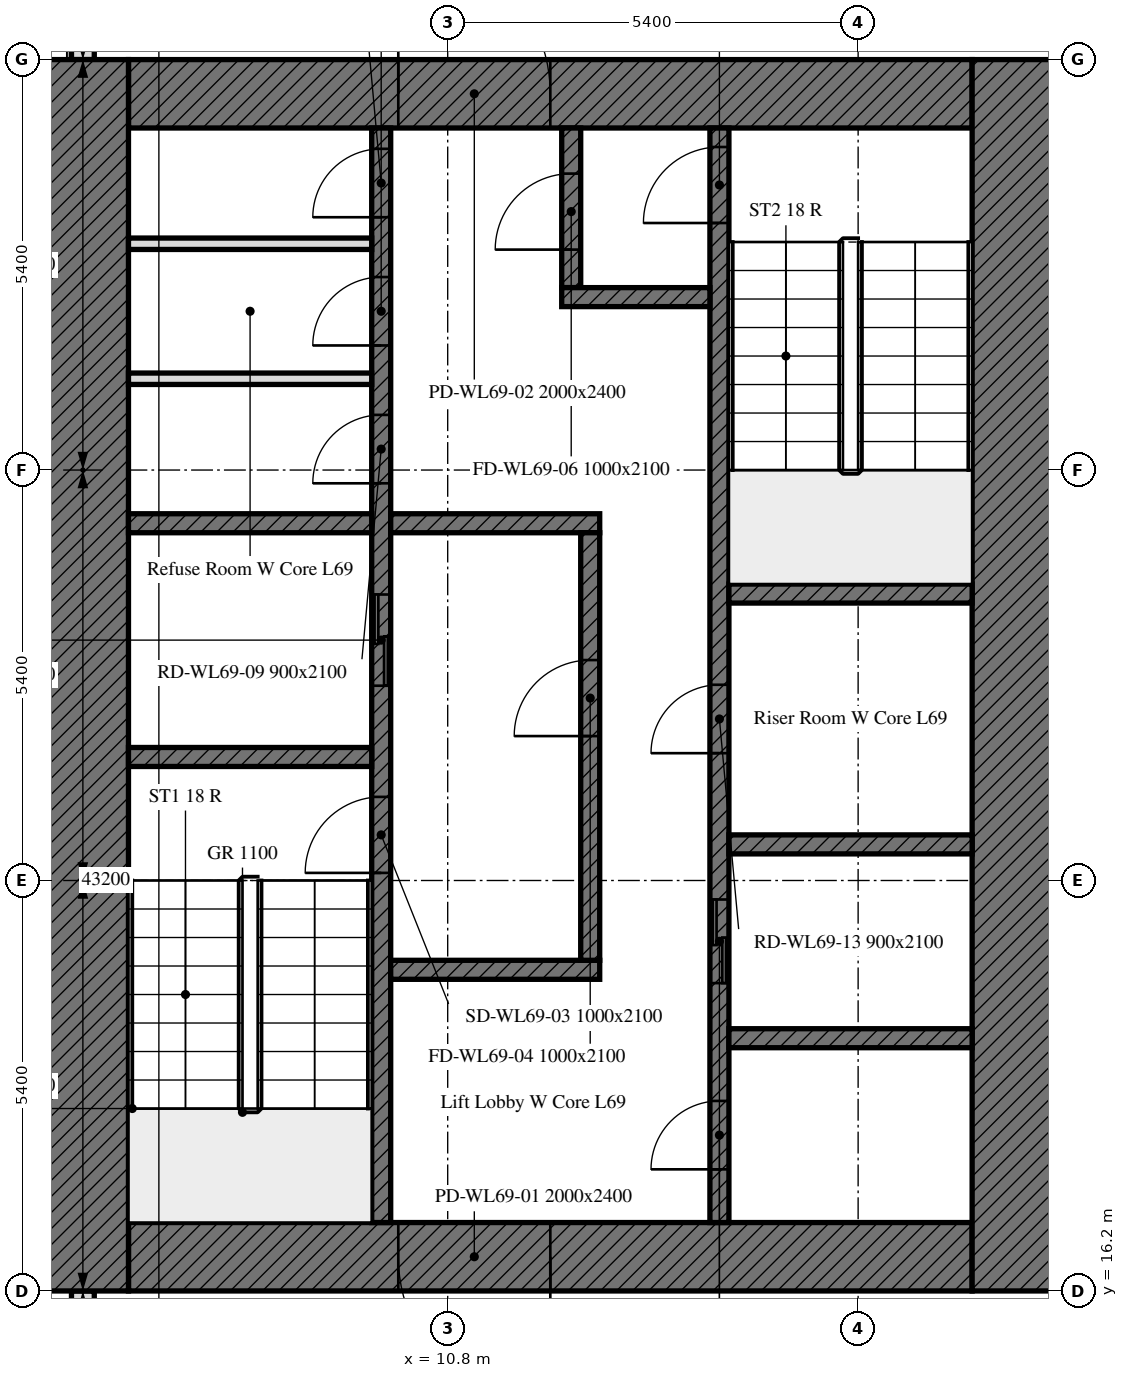
"""IFC4 building model, lengths in metres.
Left out: names, types, materials, properties, quantities, classifications, styles, units other than length and angle.
Written with IfcOpenShell. Run it as: python <this file> out.ifc"""

import sys

from ifc_helpers import new_model, si_unit, direction, frame, frame_2d, origin, place, context, subcontext, project, spatial, rectangle, extrude, element, fill, save


model = new_model("IFC4")
c1 = context("Model", 3, precision=1e-05, world=origin(), true_north=direction((0.0, 1.0)))
c2 = subcontext(c1, "Body", "Model", "MODEL_VIEW")
j1 = project(units=[si_unit("LENGTHUNIT", "METRE"), si_unit("PLANEANGLEUNIT", "RADIAN")], contexts=[c1])
p1 = place(None, origin())
s1 = spatial("IfcSite", under=j1, at=p1, CompositionType="ELEMENT")
p2 = place(p1, origin())
s2 = spatial("IfcBuilding", under=s1, at=p2, CompositionType="ELEMENT")
p3 = place(p2, frame((0.0, 0.0, 281.8)))
s3 = spatial("IfcBuildingStorey", under=s2, at=p3, CompositionType="ELEMENT", Elevation=281.8)
p4 = place(p3, frame((6.0, 37.614, 0.0), z_axis=(0.0, 0.0, 1.0), x_axis=(0.0, -1.0, 0.0)))
e1 = element("IfcWall", 1, at=p4, inside=s3, PredefinedType="SOLIDWALL", context=c2, shape_type="SweptSolid", body=[
    extrude(rectangle(XDim=5.214, YDim=0.3, at=frame_2d((2.607, 0.0))), origin(), (0.0, 0.0, 1.0), 3.0),
])
p5 = place(p4, frame((1.164, 0.0, 0.9)))
e2 = element("IfcOpeningElement", 2, at=p5, cuts=e1, PredefinedType="OPENING", context=c2, shape_type="SweptSolid", body=[
    extrude(rectangle(XDim=1.1, YDim=1.7, at=frame_2d((0.55, 0.85))), frame((0.0, 0.16, 0.0), z_axis=(0.0, -1.0, 0.0), x_axis=(1.0, 0.0, 0.0)), (0.0, 0.0, 1.0), 0.32),
])
p6 = place(p4, frame((3.139, 0.0, 0.9)))
e3 = element("IfcOpeningElement", 3, at=p6, cuts=e1, PredefinedType="OPENING", context=c2, shape_type="SweptSolid", body=[
    extrude(rectangle(XDim=0.65, YDim=1.7, at=frame_2d((0.325, 0.85))), frame((0.0, 0.16, 0.0), z_axis=(0.0, -1.0, 0.0), x_axis=(1.0, 0.0, 0.0)), (0.0, 0.0, 1.0), 0.32),
])
p7 = place(p3, frame((6.0, 16.2, 0.0), z_axis=(0.0, 0.0, 1.0), x_axis=(0.0, -1.0, 0.0)))
e4 = element("IfcWall", 4, at=p7, inside=s3, PredefinedType="SOLIDWALL", context=c2, shape_type="SweptSolid", body=[
    extrude(rectangle(XDim=10.614, YDim=0.3, at=frame_2d((5.307, 0.0))), origin(), (0.0, 0.0, 1.0), 3.0),
])
p8 = place(p7, frame((1.0, 0.0, 0.9)))
e5 = element("IfcOpeningElement", 5, at=p8, cuts=e4, PredefinedType="OPENING", context=c2, shape_type="SweptSolid", body=[
    extrude(rectangle(XDim=1.1, YDim=1.7, at=frame_2d((0.55, 0.85))), frame((0.0, 0.16, 0.0), z_axis=(0.0, -1.0, 0.0), x_axis=(1.0, 0.0, 0.0)), (0.0, 0.0, 1.0), 0.32),
])
p9 = place(p7, frame((2.95, 0.0, 0.9)))
e6 = element("IfcOpeningElement", 6, at=p9, cuts=e4, PredefinedType="OPENING", context=c2, shape_type="SweptSolid", body=[
    extrude(rectangle(XDim=1.1, YDim=1.7, at=frame_2d((0.55, 0.85))), frame((0.0, 0.16, 0.0), z_axis=(0.0, -1.0, 0.0), x_axis=(1.0, 0.0, 0.0)), (0.0, 0.0, 1.0), 0.32),
])
p10 = place(p7, frame((6.4, 0.0, 0.9)))
e7 = element("IfcOpeningElement", 7, at=p10, cuts=e4, PredefinedType="OPENING", context=c2, shape_type="SweptSolid", body=[
    extrude(rectangle(XDim=3.4, YDim=1.7, at=frame_2d((1.7, 0.85))), frame((0.0, 0.16, 0.0), z_axis=(0.0, -1.0, 0.0), x_axis=(1.0, 0.0, 0.0)), (0.0, 0.0, 1.0), 0.32),
])
p11 = place(p3, frame((17.7, 16.65, 0.0), z_axis=(0.0, 0.0, 1.0), x_axis=(-1.0, 0.0, 0.0)))
e8 = element("IfcWall", 8, at=p11, inside=s3, PredefinedType="SOLIDWALL", context=c2, shape_type="SweptSolid", body=[
    extrude(rectangle(XDim=11.1, YDim=0.9, at=frame_2d((5.55, 0.0))), origin(), (0.0, 0.0, 1.0), 3.0),
])
p12 = place(p11, frame((5.55, 0.0, 0.0)))
e9 = element("IfcOpeningElement", 9, at=p12, cuts=e8, PredefinedType="OPENING", context=c2, shape_type="SweptSolid", body=[
    extrude(rectangle(XDim=2.0, YDim=2.4, at=frame_2d((1.0, 1.2))), frame((0.0, 0.45, 0.0), z_axis=(0.0, -1.0, 0.0), x_axis=(1.0, 0.0, 0.0)), (0.0, 0.0, 1.0), 0.9),
])
p13 = place(p3, frame((6.6, 31.95, 0.0), z_axis=(0.0, 0.0, 1.0), x_axis=(1.0, 0.0, 0.0)))
e10 = element("IfcWall", 10, at=p13, inside=s3, PredefinedType="SOLIDWALL", context=c2, shape_type="SweptSolid", body=[
    extrude(rectangle(XDim=11.1, YDim=0.9, at=frame_2d((5.55, 0.0))), origin(), (0.0, 0.0, 1.0), 3.0),
])
p14 = place(p13, frame((3.55, 0.0, 0.0)))
e11 = element("IfcOpeningElement", 11, at=p14, cuts=e10, PredefinedType="OPENING", context=c2, shape_type="SweptSolid", body=[
    extrude(rectangle(XDim=2.0, YDim=2.4, at=frame_2d((1.0, 1.2))), frame((0.0, 0.45, 0.0), z_axis=(0.0, -1.0, 0.0), x_axis=(1.0, 0.0, 0.0)), (0.0, 0.0, 1.0), 0.9),
])
for number, where, z_axis, x_axis in (
    (12, (6.0, 16.2, 0.0), (0.0, 0.0, 1.0), (0.0, 1.0, 0.0)),
    (13, (18.3, 32.4, 0.0), (0.0, 0.0, 1.0), (0.0, -1.0, 0.0)),
):
    element("IfcWall", number, at=place(p3, frame(where, z_axis=z_axis, x_axis=x_axis)), inside=s3, PredefinedType="SOLIDWALL", context=c2, shape_type="SweptSolid", body=[
        extrude(rectangle(XDim=16.2, YDim=1.2, at=frame_2d((8.1, 0.0))), origin(), (0.0, 0.0, 1.0), 3.0),
    ])
p15 = place(p3, frame((9.925, 17.1, 0.0), z_axis=(0.0, 0.0, 1.0), x_axis=(0.0, 1.0, 0.0)))
e14 = element("IfcWall", 14, at=p15, inside=s3, PredefinedType="SOLIDWALL", context=c2, shape_type="SweptSolid", body=[
    extrude(rectangle(XDim=14.4, YDim=0.25, at=frame_2d((7.2, 0.0))), origin(), (0.0, 0.0, 1.0), 3.0),
])
p16 = place(p15, frame((4.6, 0.0, 0.0)))
e15 = element("IfcOpeningElement", 15, at=p16, cuts=e14, PredefinedType="OPENING", context=c2, shape_type="SweptSolid", body=[
    extrude(rectangle(XDim=1.0, YDim=2.1, at=frame_2d((0.5, 1.05))), frame((0.0, 0.125, 0.0), z_axis=(0.0, -1.0, 0.0), x_axis=(1.0, 0.0, 0.0)), (0.0, 0.0, 1.0), 0.25),
])
p17 = place(p15, frame((7.062, 0.0, 0.0)))
e16 = element("IfcOpeningElement", 16, at=p17, cuts=e14, PredefinedType="OPENING", context=c2, shape_type="SweptSolid", body=[
    extrude(rectangle(XDim=1.2, YDim=2.1, at=frame_2d((0.6, 1.05))), frame((0.0, 0.125, 0.0), z_axis=(0.0, -1.0, 0.0), x_axis=(1.0, 0.0, 0.0)), (0.0, 0.0, 1.0), 0.25),
])
p18 = place(p15, frame((9.726, 0.0, 0.0)))
e17 = element("IfcOpeningElement", 17, at=p18, cuts=e14, PredefinedType="OPENING", context=c2, shape_type="SweptSolid", body=[
    extrude(rectangle(XDim=0.9, YDim=2.1, at=frame_2d((0.45, 1.05))), frame((0.0, 0.125, 0.0), z_axis=(0.0, -1.0, 0.0), x_axis=(1.0, 0.0, 0.0)), (0.0, 0.0, 1.0), 0.25),
])
p19 = place(p15, frame((11.539, 0.0, 0.0)))
e18 = element("IfcOpeningElement", 18, at=p19, cuts=e14, PredefinedType="OPENING", context=c2, shape_type="SweptSolid", body=[
    extrude(rectangle(XDim=0.9, YDim=2.1, at=frame_2d((0.45, 1.05))), frame((0.0, 0.125, 0.0), z_axis=(0.0, -1.0, 0.0), x_axis=(1.0, 0.0, 0.0)), (0.0, 0.0, 1.0), 0.25),
])
p20 = place(p15, frame((13.226, 0.0, 0.0)))
e19 = element("IfcOpeningElement", 19, at=p20, cuts=e14, PredefinedType="OPENING", context=c2, shape_type="SweptSolid", body=[
    extrude(rectangle(XDim=0.9, YDim=2.1, at=frame_2d((0.45, 1.05))), frame((0.0, 0.125, 0.0), z_axis=(0.0, -1.0, 0.0), x_axis=(1.0, 0.0, 0.0)), (0.0, 0.0, 1.0), 0.25),
])
p21 = place(p3, frame((14.375, 17.1, 0.0), z_axis=(0.0, 0.0, 1.0), x_axis=(0.0, 1.0, 0.0)))
e20 = element("IfcWall", 20, at=p21, inside=s3, PredefinedType="SOLIDWALL", context=c2, shape_type="SweptSolid", body=[
    extrude(rectangle(XDim=14.4, YDim=0.25, at=frame_2d((7.2, 0.0))), origin(), (0.0, 0.0, 1.0), 3.0),
])
p22 = place(p21, frame((13.15, 0.0, 0.0)))
e21 = element("IfcOpeningElement", 21, at=p22, cuts=e20, PredefinedType="OPENING", context=c2, shape_type="SweptSolid", body=[
    extrude(rectangle(XDim=1.0, YDim=2.1, at=frame_2d((0.5, 1.05))), frame((0.0, 0.125, 0.0), z_axis=(0.0, -1.0, 0.0), x_axis=(1.0, 0.0, 0.0)), (0.0, 0.0, 1.0), 0.25),
])
p23 = place(p21, frame((3.15, 0.0, 0.0)))
e22 = element("IfcOpeningElement", 22, at=p23, cuts=e20, PredefinedType="OPENING", context=c2, shape_type="SweptSolid", body=[
    extrude(rectangle(XDim=1.1, YDim=2.1, at=frame_2d((0.55, 1.05))), frame((0.0, 0.125, 0.0), z_axis=(0.0, -1.0, 0.0), x_axis=(1.0, 0.0, 0.0)), (0.0, 0.0, 1.0), 0.25),
])
p24 = place(p21, frame((0.7, 0.0, 0.0)))
e23 = element("IfcOpeningElement", 23, at=p24, cuts=e20, PredefinedType="OPENING", context=c2, shape_type="SweptSolid", body=[
    extrude(rectangle(XDim=0.9, YDim=2.1, at=frame_2d((0.45, 1.05))), frame((0.0, 0.125, 0.0), z_axis=(0.0, -1.0, 0.0), x_axis=(1.0, 0.0, 0.0)), (0.0, 0.0, 1.0), 0.25),
])
p25 = place(p21, frame((6.175, 0.0, 0.0)))
e24 = element("IfcOpeningElement", 24, at=p25, cuts=e20, PredefinedType="OPENING", context=c2, shape_type="SweptSolid", body=[
    extrude(rectangle(XDim=0.9, YDim=2.1, at=frame_2d((0.45, 1.05))), frame((0.0, 0.125, 0.0), z_axis=(0.0, -1.0, 0.0), x_axis=(1.0, 0.0, 0.0)), (0.0, 0.0, 1.0), 0.25),
])
for number, where, z_axis, x_axis in (
    (25, (6.6, 23.225, 0.0), (0.0, 0.0, 1.0), (1.0, 0.0, 0.0)),
    (26, (14.5, 25.375, 0.0), (0.0, 0.0, 1.0), (1.0, 0.0, 0.0)),
    (27, (14.5, 22.075, 0.0), (0.0, 0.0, 1.0), (1.0, 0.0, 0.0)),
    (28, (6.6, 26.3, 0.0), (0.0, 0.0, 1.0), (1.0, 0.0, 0.0)),
):
    element("IfcWall", number, at=place(p3, frame(where, z_axis=z_axis, x_axis=x_axis)), inside=s3, PredefinedType="SOLIDWALL", context=c2, shape_type="SweptSolid", body=[
        extrude(rectangle(XDim=3.2, YDim=0.25, at=frame_2d((1.6, 0.0))), origin(), (0.0, 0.0, 1.0), 3.0),
    ])
for number, where, z_axis, x_axis in (
    (29, (10.05, 26.3, 0.0), (0.0, 0.0, 1.0), (1.0, 0.0, 0.0)),
    (30, (10.05, 20.425, 0.0), (0.0, 0.0, 1.0), (1.0, 0.0, 0.0)),
):
    element("IfcWall", number, at=place(p3, frame(where, z_axis=z_axis, x_axis=x_axis)), inside=s3, PredefinedType="SOLIDWALL", context=c2, shape_type="SweptSolid", body=[
        extrude(rectangle(XDim=2.75, YDim=0.25, at=frame_2d((1.375, 0.0))), origin(), (0.0, 0.0, 1.0), 3.0),
    ])
p26 = place(p3, frame((12.425, 29.4, 0.0), z_axis=(0.0, 0.0, 1.0), x_axis=(0.0, 1.0, 0.0)))
e31 = element("IfcWall", 31, at=p26, inside=s3, PredefinedType="SOLIDWALL", context=c2, shape_type="SweptSolid", body=[
    extrude(rectangle(XDim=2.1, YDim=0.25, at=frame_2d((1.05, 0.0))), origin(), (0.0, 0.0, 1.0), 3.0),
])
p27 = place(p26, frame((0.5, 0.0, 0.0)))
e32 = element("IfcOpeningElement", 32, at=p27, cuts=e31, PredefinedType="OPENING", context=c2, shape_type="SweptSolid", body=[
    extrude(rectangle(XDim=1.0, YDim=2.1, at=frame_2d((0.5, 1.05))), frame((0.0, 0.125, 0.0), z_axis=(0.0, -1.0, 0.0), x_axis=(1.0, 0.0, 0.0)), (0.0, 0.0, 1.0), 0.25),
])
p28 = place(p3, frame((12.3, 29.275, 0.0), z_axis=(0.0, 0.0, 1.0), x_axis=(1.0, 0.0, 0.0)))
e33 = element("IfcWall", 33, at=p28, inside=s3, PredefinedType="SOLIDWALL", context=c2, shape_type="SweptSolid", body=[
    extrude(rectangle(XDim=1.95, YDim=0.25, at=frame_2d((0.975, 0.0))), origin(), (0.0, 0.0, 1.0), 3.0),
])
p29 = place(p3, frame((12.675, 20.55, 0.0), z_axis=(0.0, 0.0, 1.0), x_axis=(0.0, 1.0, 0.0)))
e34 = element("IfcWall", 34, at=p29, inside=s3, PredefinedType="SOLIDWALL", context=c2, shape_type="SweptSolid", body=[
    extrude(rectangle(XDim=5.625, YDim=0.25, at=frame_2d((2.812, 0.0))), origin(), (0.0, 0.0, 1.0), 3.0),
])
p30 = place(p29, frame((2.95, 0.0, 0.0)))
e35 = element("IfcOpeningElement", 35, at=p30, cuts=e34, PredefinedType="OPENING", context=c2, shape_type="SweptSolid", body=[
    extrude(rectangle(XDim=1.0, YDim=2.1, at=frame_2d((0.5, 1.05))), frame((0.0, 0.125, 0.0), z_axis=(0.0, -1.0, 0.0), x_axis=(1.0, 0.0, 0.0)), (0.0, 0.0, 1.0), 0.25),
])
p31 = place(p3, frame((14.5, 19.525, 0.0), z_axis=(0.0, 0.0, 1.0), x_axis=(1.0, 0.0, 0.0)))
e36 = element("IfcWall", 36, at=p31, inside=s3, PredefinedType="SOLIDWALL", context=c2, shape_type="SweptSolid", body=[
    extrude(rectangle(XDim=3.2, YDim=0.25, at=frame_2d((1.6, 0.0))), origin(), (0.0, 0.0, 1.0), 3.0),
])
for number, where, z_axis, x_axis in (
    (37, (6.6, 28.201, 0.0), (0.0, 0.0, 1.0), (1.0, 0.0, 0.0)),
    (38, (6.6, 29.977, 0.0), (0.0, 0.0, 1.0), (1.0, 0.0, 0.0)),
):
    element("IfcWall", number, at=place(p3, frame(where, z_axis=z_axis, x_axis=x_axis)), inside=s3, PredefinedType="PARTITIONING", context=c2, shape_type="SweptSolid", body=[
        extrude(rectangle(XDim=3.2, YDim=0.15, at=frame_2d((1.6, 0.0))), origin(), (0.0, 0.0, 1.0), 3.0),
    ])
p32 = place(p12, origin())
e39 = element("IfcDoor", 39, at=p32, inside=s3, OperationType="DOUBLE_DOOR_SINGLE_SWING", PredefinedType="DOOR", context=c2, shape_type="SweptSolid", body=[
    extrude(rectangle(XDim=2.0, YDim=2.4, at=frame_2d((1.0, 1.2))), frame((0.0, 0.025, 0.0), z_axis=(0.0, -1.0, 0.0), x_axis=(1.0, 0.0, 0.0)), (0.0, 0.0, 1.0), 0.05),
])
fill(e9, e39)
p33 = place(p14, origin())
e40 = element("IfcDoor", 40, at=p33, inside=s3, OperationType="DOUBLE_DOOR_SINGLE_SWING", PredefinedType="DOOR", context=c2, shape_type="SweptSolid", body=[
    extrude(rectangle(XDim=2.0, YDim=2.4, at=frame_2d((1.0, 1.2))), frame((0.0, 0.025, 0.0), z_axis=(0.0, -1.0, 0.0), x_axis=(1.0, 0.0, 0.0)), (0.0, 0.0, 1.0), 0.05),
])
fill(e11, e40)
p34 = place(p16, origin())
e41 = element("IfcDoor", 41, at=p34, inside=s3, OperationType="SINGLE_SWING_LEFT", PredefinedType="DOOR", context=c2, shape_type="SweptSolid", body=[
    extrude(rectangle(XDim=1.0, YDim=2.1, at=frame_2d((0.5, 1.05))), frame((0.0, 0.025, 0.0), z_axis=(0.0, -1.0, 0.0), x_axis=(1.0, 0.0, 0.0)), (0.0, 0.0, 1.0), 0.05),
])
fill(e15, e41)
p35 = place(p30, origin())
e42 = element("IfcDoor", 42, at=p35, inside=s3, OperationType="SINGLE_SWING_LEFT", PredefinedType="DOOR", context=c2, shape_type="SweptSolid", body=[
    extrude(rectangle(XDim=1.0, YDim=2.1, at=frame_2d((0.5, 1.05))), frame((0.0, 0.025, 0.0), z_axis=(0.0, -1.0, 0.0), x_axis=(1.0, 0.0, 0.0)), (0.0, 0.0, 1.0), 0.05),
])
fill(e35, e42)
p36 = place(p22, origin())
e43 = element("IfcDoor", 43, at=p36, inside=s3, OperationType="SINGLE_SWING_LEFT", PredefinedType="DOOR", context=c2, shape_type="SweptSolid", body=[
    extrude(rectangle(XDim=1.0, YDim=2.1, at=frame_2d((0.5, 1.05))), frame((0.0, 0.025, 0.0), z_axis=(0.0, -1.0, 0.0), x_axis=(1.0, 0.0, 0.0)), (0.0, 0.0, 1.0), 0.05),
])
fill(e21, e43)
p37 = place(p27, origin())
e44 = element("IfcDoor", 44, at=p37, inside=s3, OperationType="SINGLE_SWING_LEFT", PredefinedType="DOOR", context=c2, shape_type="SweptSolid", body=[
    extrude(rectangle(XDim=1.0, YDim=2.1, at=frame_2d((0.5, 1.05))), frame((0.0, 0.025, 0.0), z_axis=(0.0, -1.0, 0.0), x_axis=(1.0, 0.0, 0.0)), (0.0, 0.0, 1.0), 0.05),
])
fill(e32, e44)
p38 = place(p17, origin())
e45 = element("IfcDoor", 45, at=p38, inside=s3, OperationType="DOUBLE_DOOR_SLIDING", PredefinedType="DOOR", context=c2, shape_type="SweptSolid", body=[
    extrude(rectangle(XDim=1.2, YDim=2.1, at=frame_2d((0.6, 1.05))), frame((0.0, 0.025, 0.0), z_axis=(0.0, -1.0, 0.0), x_axis=(1.0, 0.0, 0.0)), (0.0, 0.0, 1.0), 0.05),
])
fill(e16, e45)
p39 = place(p23, origin())
e46 = element("IfcDoor", 46, at=p39, inside=s3, OperationType="DOUBLE_DOOR_SLIDING", PredefinedType="DOOR", context=c2, shape_type="SweptSolid", body=[
    extrude(rectangle(XDim=1.1, YDim=2.1, at=frame_2d((0.55, 1.05))), frame((0.0, 0.025, 0.0), z_axis=(0.0, -1.0, 0.0), x_axis=(1.0, 0.0, 0.0)), (0.0, 0.0, 1.0), 0.05),
])
fill(e22, e46)
p40 = place(p18, origin())
e47 = element("IfcDoor", 47, at=p40, inside=s3, OperationType="SINGLE_SWING_LEFT", PredefinedType="DOOR", context=c2, shape_type="SweptSolid", body=[
    extrude(rectangle(XDim=0.9, YDim=2.1, at=frame_2d((0.45, 1.05))), frame((0.0, 0.025, 0.0), z_axis=(0.0, -1.0, 0.0), x_axis=(1.0, 0.0, 0.0)), (0.0, 0.0, 1.0), 0.05),
])
fill(e17, e47)
p41 = place(p19, origin())
e48 = element("IfcDoor", 48, at=p41, inside=s3, OperationType="SINGLE_SWING_LEFT", PredefinedType="DOOR", context=c2, shape_type="SweptSolid", body=[
    extrude(rectangle(XDim=0.9, YDim=2.1, at=frame_2d((0.45, 1.05))), frame((0.0, 0.025, 0.0), z_axis=(0.0, -1.0, 0.0), x_axis=(1.0, 0.0, 0.0)), (0.0, 0.0, 1.0), 0.05),
])
fill(e18, e48)
p42 = place(p20, origin())
e49 = element("IfcDoor", 49, at=p42, inside=s3, OperationType="SINGLE_SWING_LEFT", PredefinedType="DOOR", context=c2, shape_type="SweptSolid", body=[
    extrude(rectangle(XDim=0.9, YDim=2.1, at=frame_2d((0.45, 1.05))), frame((0.0, 0.025, 0.0), z_axis=(0.0, -1.0, 0.0), x_axis=(1.0, 0.0, 0.0)), (0.0, 0.0, 1.0), 0.05),
])
fill(e19, e49)
p43 = place(p24, origin())
e50 = element("IfcDoor", 50, at=p43, inside=s3, OperationType="SINGLE_SWING_LEFT", PredefinedType="DOOR", context=c2, shape_type="SweptSolid", body=[
    extrude(rectangle(XDim=0.9, YDim=2.1, at=frame_2d((0.45, 1.05))), frame((0.0, 0.025, 0.0), z_axis=(0.0, -1.0, 0.0), x_axis=(1.0, 0.0, 0.0)), (0.0, 0.0, 1.0), 0.05),
])
fill(e23, e50)
p44 = place(p25, origin())
e51 = element("IfcDoor", 51, at=p44, inside=s3, OperationType="SINGLE_SWING_LEFT", PredefinedType="DOOR", context=c2, shape_type="SweptSolid", body=[
    extrude(rectangle(XDim=0.9, YDim=2.1, at=frame_2d((0.45, 1.05))), frame((0.0, 0.025, 0.0), z_axis=(0.0, -1.0, 0.0), x_axis=(1.0, 0.0, 0.0)), (0.0, 0.0, 1.0), 0.05),
])
fill(e24, e51)
save(model, sys.argv[1])
